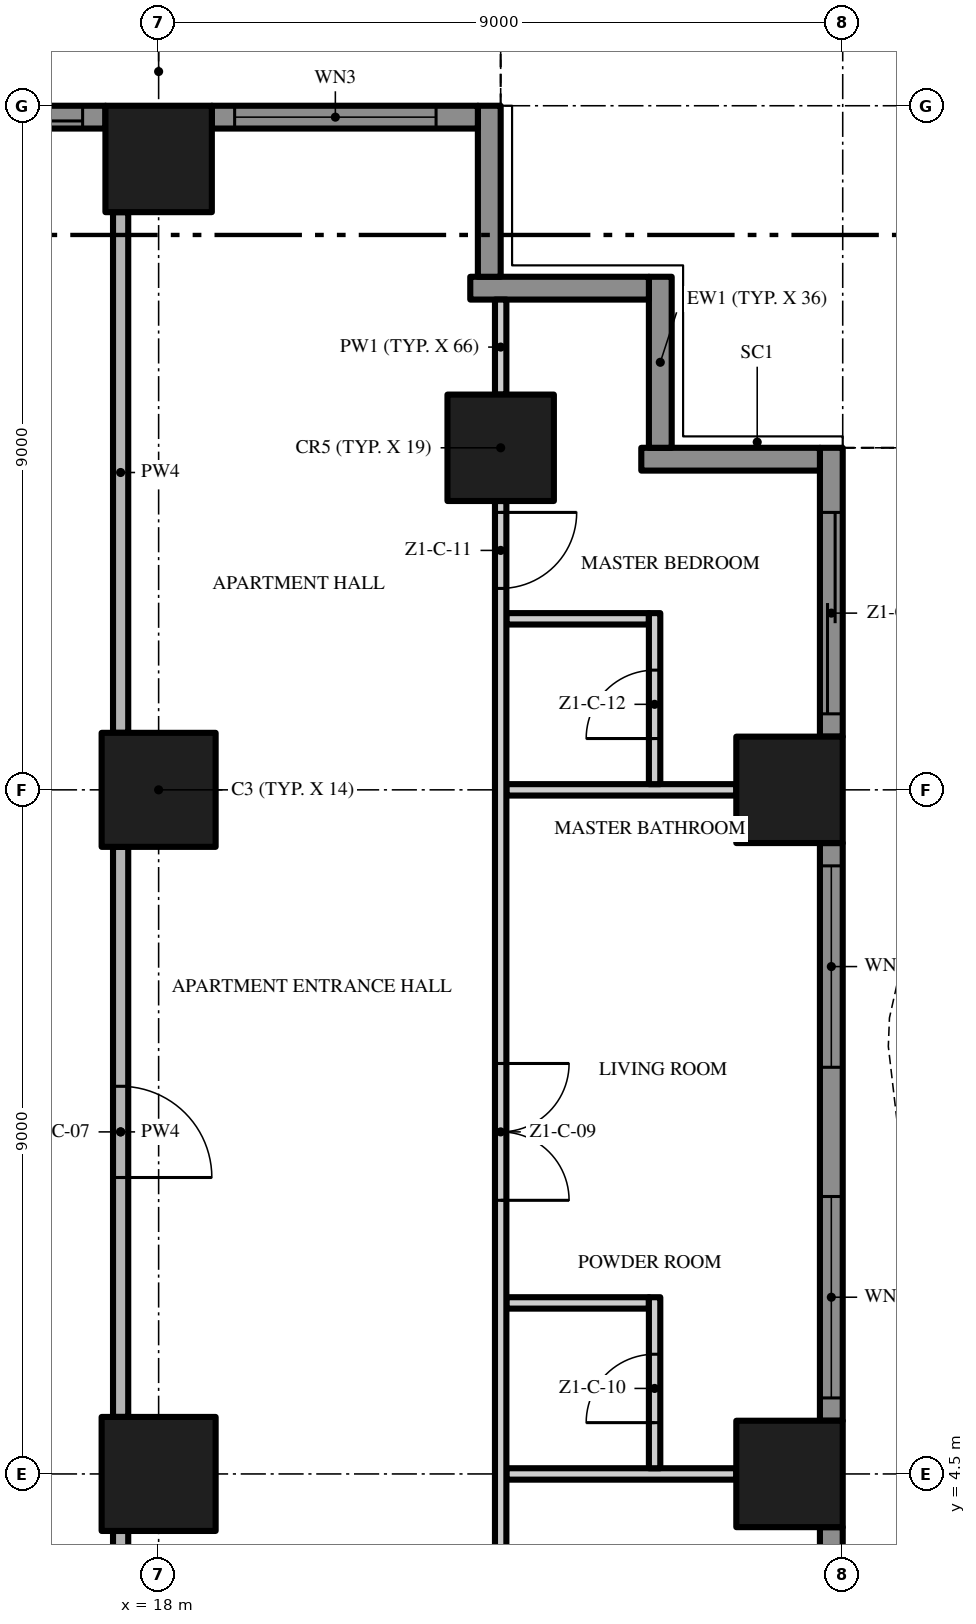
"""IFC4 building model, lengths in metres.
Left out: names, types, materials, properties, quantities, classifications, styles, units other than length and angle.
Written with IfcOpenShell. Run it as: python <this file> out.ifc"""

import sys

from ifc_helpers import new_model, si_unit, direction, frame, frame_2d, origin, origin_2d, place, context, subcontext, project, spatial, polyline, rectangle, outline, extrude, element, fill, save


model = new_model("IFC4")
c1 = context("Model", 3, precision=1e-05, world=origin(), true_north=direction((0.0, 1.0)))
c2 = subcontext(c1, "Body", "Model", "MODEL_VIEW")
j1 = project(units=[si_unit("LENGTHUNIT", "METRE"), si_unit("PLANEANGLEUNIT", "RADIAN")], contexts=[c1])
p1 = place(None, origin())
s1 = spatial("IfcSite", under=j1, at=p1, CompositionType="ELEMENT")
p2 = place(p1, origin())
s2 = spatial("IfcBuilding", under=s1, at=p2, CompositionType="ELEMENT")
p3 = place(p2, frame((0.0, 0.0, 41.6)))
s3 = spatial("IfcBuildingStorey", under=s2, at=p3, CompositionType="ELEMENT", Elevation=41.6)
p4 = place(p3, frame((18.0, 13.5, 0.0), z_axis=(0.0, 0.0, 1.0), x_axis=(1.0, 0.0, 0.0)))
e1 = element("IfcColumn", 1, at=p4, inside=s3, PredefinedType="COLUMN", context=c2, shape_type="SweptSolid", body=[
    extrude(rectangle(XDim=1.5, YDim=1.5, at=origin_2d()), origin(), (0.0, 0.0, 1.0), 3.5),
])
p5 = place(p3, frame((18.0, 21.8, 0.0), z_axis=(0.0, 0.0, 1.0), x_axis=(1.0, 0.0, 0.0)))
e2 = element("IfcColumn", 2, at=p5, inside=s3, PredefinedType="COLUMN", context=c2, shape_type="SweptSolid", body=[
    extrude(rectangle(XDim=1.4, YDim=1.4, at=origin_2d()), origin(), (0.0, 0.0, 1.0), 3.5),
])
p6 = place(p3, frame((18.0, 4.5, 0.0), z_axis=(0.0, 0.0, 1.0), x_axis=(1.0, 0.0, 0.0)))
e3 = element("IfcColumn", 3, at=p6, inside=s3, PredefinedType="COLUMN", context=c2, shape_type="SweptSolid", body=[
    extrude(rectangle(XDim=1.5, YDim=1.5, at=origin_2d()), origin(), (0.0, 0.0, 1.0), 3.5),
])
for number, where, z_axis, x_axis in (
    (4, (26.3, 13.5, 0.0), (0.0, 0.0, 1.0), (1.0, 0.0, 0.0)),
    (5, (22.5, 18.0, 0.0), (0.0, 0.0, 1.0), (1.0, 0.0, 0.0)),
    (6, (26.3, 4.5, 0.0), (0.0, 0.0, 1.0), (1.0, 0.0, 0.0)),
):
    element("IfcColumn", number, at=place(p3, frame(where, z_axis=z_axis, x_axis=x_axis)), inside=s3, PredefinedType="COLUMN", context=c2, shape_type="SweptSolid", body=[
        extrude(rectangle(XDim=1.4, YDim=1.4, at=origin_2d()), origin(), (0.0, 0.0, 1.0), 3.5),
    ])
p7 = place(p3, frame((26.85, 3.8, 0.0), z_axis=(0.0, 0.0, 1.0), x_axis=(0.0, -1.0, 0.0)))
e7 = element("IfcWall", 7, at=p7, inside=s3, PredefinedType="SOLIDWALL", context=c2, shape_type="SweptSolid", body=[
    extrude(rectangle(XDim=7.6, YDim=0.3, at=frame_2d((3.8, 0.0))), origin(), (0.0, 0.0, 1.0), 3.5),
])
p8 = place(p7, frame((4.65, 0.0, 0.45)))
e8 = element("IfcOpeningElement", 8, at=p8, cuts=e7, PredefinedType="OPENING", context=c2, shape_type="SweptSolid", body=[
    extrude(rectangle(XDim=2.65, YDim=2.65, at=frame_2d((1.325, 1.325))), frame((0.0, 0.16, 0.0), z_axis=(0.0, -1.0, 0.0), x_axis=(1.0, 0.0, 0.0)), (0.0, 0.0, 1.0), 0.32),
])
p9 = place(p7, frame((0.3, 0.0, 0.0)))
e9 = element("IfcOpeningElement", 9, at=p9, cuts=e7, PredefinedType="OPENING", context=c2, shape_type="SweptSolid", body=[
    extrude(rectangle(XDim=2.65, YDim=2.4, at=frame_2d((1.325, 1.2))), frame((0.0, 0.16, 0.0), z_axis=(0.0, -1.0, 0.0), x_axis=(1.0, 0.0, 0.0)), (0.0, 0.0, 1.0), 0.32),
])
p10 = place(p3, frame((26.85, 12.8, 0.0), z_axis=(0.0, 0.0, 1.0), x_axis=(0.0, -1.0, 0.0)))
e10 = element("IfcWall", 10, at=p10, inside=s3, PredefinedType="SOLIDWALL", context=c2, shape_type="SweptSolid", body=[
    extrude(rectangle(XDim=7.6, YDim=0.3, at=frame_2d((3.8, 0.0))), origin(), (0.0, 0.0, 1.0), 3.5),
])
p11 = place(p10, frame((4.65, 0.0, 0.45)))
e11 = element("IfcOpeningElement", 11, at=p11, cuts=e10, PredefinedType="OPENING", context=c2, shape_type="SweptSolid", body=[
    extrude(rectangle(XDim=2.65, YDim=2.65, at=frame_2d((1.325, 1.325))), frame((0.0, 0.16, 0.0), z_axis=(0.0, -1.0, 0.0), x_axis=(1.0, 0.0, 0.0)), (0.0, 0.0, 1.0), 0.32),
])
p12 = place(p10, frame((0.3, 0.0, 0.45)))
e12 = element("IfcOpeningElement", 12, at=p12, cuts=e10, PredefinedType="OPENING", context=c2, shape_type="SweptSolid", body=[
    extrude(rectangle(XDim=2.65, YDim=2.65, at=frame_2d((1.325, 1.325))), frame((0.0, 0.16, 0.0), z_axis=(0.0, -1.0, 0.0), x_axis=(1.0, 0.0, 0.0)), (0.0, 0.0, 1.0), 0.32),
])
p13 = place(p3, frame((26.85, 18.0, 0.0), z_axis=(0.0, 0.0, 1.0), x_axis=(0.0, -1.0, 0.0)))
e13 = element("IfcWall", 13, at=p13, inside=s3, PredefinedType="SOLIDWALL", context=c2, shape_type="SweptSolid", body=[
    extrude(rectangle(XDim=3.8, YDim=0.3, at=frame_2d((1.9, 0.0))), origin(), (0.0, 0.0, 1.0), 3.5),
])
p14 = place(p13, frame((0.85, 0.0, 0.0)))
e14 = element("IfcOpeningElement", 14, at=p14, cuts=e13, PredefinedType="OPENING", context=c2, shape_type="SweptSolid", body=[
    extrude(rectangle(XDim=2.65, YDim=2.4, at=frame_2d((1.325, 1.2))), frame((0.0, 0.16, 0.0), z_axis=(0.0, -1.0, 0.0), x_axis=(1.0, 0.0, 0.0)), (0.0, 0.0, 1.0), 0.32),
])
p15 = place(p3, frame((24.35, 17.85, 0.0), z_axis=(0.0, 0.0, 1.0), x_axis=(1.0, 0.0, 0.0)))
e15 = element("IfcWall", 15, at=p15, inside=s3, PredefinedType="SOLIDWALL", context=c2, shape_type="SweptSolid", body=[
    extrude(rectangle(XDim=2.35, YDim=0.3, at=frame_2d((1.175, 0.0))), origin(), (0.0, 0.0, 1.0), 3.5),
])
p16 = place(p3, frame((24.6, 20.25, 0.0), z_axis=(0.0, 0.0, 1.0), x_axis=(0.0, -1.0, 0.0)))
e16 = element("IfcWall", 16, at=p16, inside=s3, PredefinedType="SOLIDWALL", context=c2, shape_type="SweptSolid", body=[
    extrude(rectangle(XDim=2.25, YDim=0.3, at=frame_2d((1.125, 0.0))), origin(), (0.0, 0.0, 1.0), 3.5),
])
p17 = place(p3, frame((22.1, 20.1, 0.0), z_axis=(0.0, 0.0, 1.0), x_axis=(1.0, 0.0, 0.0)))
e17 = element("IfcWall", 17, at=p17, inside=s3, PredefinedType="SOLIDWALL", context=c2, shape_type="SweptSolid", body=[
    extrude(rectangle(XDim=2.35, YDim=0.3, at=frame_2d((1.175, 0.0))), origin(), (0.0, 0.0, 1.0), 3.5),
])
p18 = place(p3, frame((22.35, 22.5, 0.0), z_axis=(0.0, 0.0, 1.0), x_axis=(0.0, -1.0, 0.0)))
e18 = element("IfcWall", 18, at=p18, inside=s3, PredefinedType="SOLIDWALL", context=c2, shape_type="SweptSolid", body=[
    extrude(rectangle(XDim=2.25, YDim=0.3, at=frame_2d((1.125, 0.0))), origin(), (0.0, 0.0, 1.0), 3.5),
])
p19 = place(p3, frame((18.7, 22.35, 0.0), z_axis=(0.0, 0.0, 1.0), x_axis=(1.0, 0.0, 0.0)))
e19 = element("IfcWall", 19, at=p19, inside=s3, PredefinedType="SOLIDWALL", context=c2, shape_type="SweptSolid", body=[
    extrude(rectangle(XDim=3.5, YDim=0.3, at=frame_2d((1.75, 0.0))), origin(), (0.0, 0.0, 1.0), 3.5),
])
p20 = place(p19, frame((0.3, 0.0, 0.45)))
e20 = element("IfcOpeningElement", 20, at=p20, cuts=e19, PredefinedType="OPENING", context=c2, shape_type="SweptSolid", body=[
    extrude(rectangle(XDim=2.65, YDim=2.65, at=frame_2d((1.325, 1.325))), frame((0.0, 0.16, 0.0), z_axis=(0.0, -1.0, 0.0), x_axis=(1.0, 0.0, 0.0)), (0.0, 0.0, 1.0), 0.32),
])
p21 = place(p3, frame((13.5, 22.35, 0.0), z_axis=(0.0, 0.0, 1.0), x_axis=(1.0, 0.0, 0.0)))
e21 = element("IfcWall", 21, at=p21, inside=s3, PredefinedType="SOLIDWALL", context=c2, shape_type="SweptSolid", body=[
    extrude(rectangle(XDim=3.8, YDim=0.3, at=frame_2d((1.9, 0.0))), origin(), (0.0, 0.0, 1.0), 3.5),
])
p22 = place(p21, frame((0.85, 0.0, 0.0)))
e22 = element("IfcOpeningElement", 22, at=p22, cuts=e21, PredefinedType="OPENING", context=c2, shape_type="SweptSolid", body=[
    extrude(rectangle(XDim=2.65, YDim=2.4, at=frame_2d((1.325, 1.2))), frame((0.0, 0.16, 0.0), z_axis=(0.0, -1.0, 0.0), x_axis=(1.0, 0.0, 0.0)), (0.0, 0.0, 1.0), 0.32),
])
p23 = place(p3, origin())
e23 = element("IfcWall", 23, at=p23, inside=s3, PredefinedType="USERDEFINED", context=c2, shape_type="SweptSolid", body=[
    extrude(outline(polyline([(27.951, -18.0), (28.612, -16.5), (29.345, -15.0), (29.869, -13.5), (30.0, -12.375), (29.985, -12.0), (29.649, -10.5), (28.988, -9.0), (28.255, -7.5), (27.731, -6.0), (27.6, -4.875), (27.615, -4.5), (27.951, -3.0), (28.612, -1.5), (29.345, 0.0), (29.869, 1.5), (30.0, 2.625), (29.985, 3.0), (29.649, 4.5), (28.988, 6.0), (28.255, 7.5), (27.731, 9.0), (27.6, 10.125), (27.615, 10.5), (27.951, 12.0), (28.612, 13.5), (29.345, 15.0), (29.869, 16.5), (30.0, 17.625), (29.985, 18.0), (29.735, 17.99), (29.749, 17.635), (29.624, 16.556), (29.114, 15.096), (28.385, 13.605), (27.713, 12.079), (27.366, 10.533), (27.349, 10.115), (27.486, 8.944), (28.024, 7.404), (28.761, 5.895), (29.41, 4.421), (29.736, 2.967), (29.749, 2.635), (29.624, 1.556), (29.114, 0.096), (28.385, -1.395), (27.713, -2.921), (27.366, -4.467), (27.349, -4.885), (27.486, -6.056), (28.024, -7.596), (28.761, -9.105), (29.41, -10.579), (29.736, -12.033), (29.749, -12.365), (29.624, -13.444), (29.114, -14.904), (28.385, -16.395), (27.723, -17.899), (27.951, -18.0)])), origin(), (0.0, 0.0, 1.0), 0.9),
])
p24 = place(p3, frame((22.575, 4.5, 0.0), z_axis=(0.0, 0.0, 1.0), x_axis=(1.0, 0.0, 0.0)))
e24 = element("IfcWall", 24, at=p24, inside=s3, PredefinedType="PARTITIONING", context=c2, shape_type="SweptSolid", body=[
    extrude(rectangle(XDim=3.025, YDim=0.15, at=frame_2d((1.512, 0.0))), origin(), (0.0, 0.0, 1.0), 3.5),
])
p25 = place(p3, frame((22.575, 6.75, 0.0), z_axis=(0.0, 0.0, 1.0), x_axis=(1.0, 0.0, 0.0)))
e25 = element("IfcWall", 25, at=p25, inside=s3, PredefinedType="PARTITIONING", context=c2, shape_type="SweptSolid", body=[
    extrude(rectangle(XDim=1.875, YDim=0.15, at=frame_2d((0.938, 0.0))), origin(), (0.0, 0.0, 1.0), 3.5),
])
p26 = place(p3, frame((22.575, 13.5, 0.0), z_axis=(0.0, 0.0, 1.0), x_axis=(1.0, 0.0, 0.0)))
e26 = element("IfcWall", 26, at=p26, inside=s3, PredefinedType="PARTITIONING", context=c2, shape_type="SweptSolid", body=[
    extrude(rectangle(XDim=3.025, YDim=0.15, at=frame_2d((1.512, 0.0))), origin(), (0.0, 0.0, 1.0), 3.5),
])
p27 = place(p3, frame((22.575, 15.75, 0.0), z_axis=(0.0, 0.0, 1.0), x_axis=(1.0, 0.0, 0.0)))
e27 = element("IfcWall", 27, at=p27, inside=s3, PredefinedType="PARTITIONING", context=c2, shape_type="SweptSolid", body=[
    extrude(rectangle(XDim=1.875, YDim=0.15, at=frame_2d((0.938, 0.0))), origin(), (0.0, 0.0, 1.0), 3.5),
])
p28 = place(p3, frame((17.5, -0.2, 0.0), z_axis=(0.0, 0.0, 1.0), x_axis=(0.0, 1.0, 0.0)))
e28 = element("IfcWall", 28, at=p28, inside=s3, PredefinedType="PARTITIONING", context=c2, shape_type="SweptSolid", body=[
    extrude(rectangle(XDim=3.95, YDim=0.2, at=frame_2d((1.975, 0.0))), origin(), (0.0, 0.0, 1.0), 3.5),
])
p29 = place(p3, frame((17.5, 12.75, 0.0), z_axis=(0.0, 0.0, 1.0), x_axis=(0.0, -1.0, 0.0)))
e29 = element("IfcWall", 29, at=p29, inside=s3, PredefinedType="PARTITIONING", context=c2, shape_type="SweptSolid", body=[
    extrude(rectangle(XDim=7.5, YDim=0.2, at=frame_2d((3.75, 0.0))), origin(), (0.0, 0.0, 1.0), 3.5),
])
p30 = place(p29, frame((3.15, 0.0, 0.0)))
e30 = element("IfcOpeningElement", 30, at=p30, cuts=e29, PredefinedType="OPENING", context=c2, shape_type="SweptSolid", body=[
    extrude(rectangle(XDim=1.2, YDim=2.4, at=frame_2d((0.6, 1.2))), frame((0.0, 0.11, 0.0), z_axis=(0.0, -1.0, 0.0), x_axis=(1.0, 0.0, 0.0)), (0.0, 0.0, 1.0), 0.22),
])
p31 = place(p3, frame((17.5, 14.25, 0.0), z_axis=(0.0, 0.0, 1.0), x_axis=(0.0, 1.0, 0.0)))
e31 = element("IfcWall", 31, at=p31, inside=s3, PredefinedType="PARTITIONING", context=c2, shape_type="SweptSolid", body=[
    extrude(rectangle(XDim=6.85, YDim=0.2, at=frame_2d((3.425, 0.0))), origin(), (0.0, 0.0, 1.0), 3.5),
])
p32 = place(p3, frame((22.5, 17.3, 0.0), z_axis=(0.0, 0.0, 1.0), x_axis=(0.0, -1.0, 0.0)))
e32 = element("IfcWall", 32, at=p32, inside=s3, PredefinedType="PARTITIONING", context=c2, shape_type="SweptSolid", body=[
    extrude(rectangle(XDim=17.2, YDim=0.15, at=frame_2d((8.6, 0.0))), origin(), (0.0, 0.0, 1.0), 3.5),
])
p33 = place(p32, frame((14.55, 0.0, 0.0)))
e33 = element("IfcOpeningElement", 33, at=p33, cuts=e32, PredefinedType="OPENING", context=c2, shape_type="SweptSolid", body=[
    extrude(rectangle(XDim=1.0, YDim=2.4, at=frame_2d((0.5, 1.2))), frame((0.0, 0.085, 0.0), z_axis=(0.0, -1.0, 0.0), x_axis=(1.0, 0.0, 0.0)), (0.0, 0.0, 1.0), 0.17),
])
p34 = place(p32, frame((7.4, 0.0, 0.0)))
e34 = element("IfcOpeningElement", 34, at=p34, cuts=e32, PredefinedType="OPENING", context=c2, shape_type="SweptSolid", body=[
    extrude(rectangle(XDim=1.8, YDim=2.4, at=frame_2d((0.9, 1.2))), frame((0.0, 0.085, 0.0), z_axis=(0.0, -1.0, 0.0), x_axis=(1.0, 0.0, 0.0)), (0.0, 0.0, 1.0), 0.17),
])
p35 = place(p32, frame((0.15, 0.0, 0.0)))
e35 = element("IfcOpeningElement", 35, at=p35, cuts=e32, PredefinedType="OPENING", context=c2, shape_type="SweptSolid", body=[
    extrude(rectangle(XDim=1.0, YDim=2.4, at=frame_2d((0.5, 1.2))), frame((0.0, 0.085, 0.0), z_axis=(0.0, -1.0, 0.0), x_axis=(1.0, 0.0, 0.0)), (0.0, 0.0, 1.0), 0.17),
])
p36 = place(p3, frame((22.5, 18.7, 0.0), z_axis=(0.0, 0.0, 1.0), x_axis=(0.0, 1.0, 0.0)))
e36 = element("IfcWall", 36, at=p36, inside=s3, PredefinedType="PARTITIONING", context=c2, shape_type="SweptSolid", body=[
    extrude(rectangle(XDim=1.25, YDim=0.15, at=frame_2d((0.625, 0.0))), origin(), (0.0, 0.0, 1.0), 3.5),
])
p37 = place(p3, frame((24.525, 4.575, 0.0), z_axis=(0.0, 0.0, 1.0), x_axis=(0.0, 1.0, 0.0)))
e37 = element("IfcWall", 37, at=p37, inside=s3, PredefinedType="PARTITIONING", context=c2, shape_type="SweptSolid", body=[
    extrude(rectangle(XDim=2.25, YDim=0.15, at=frame_2d((1.125, 0.0))), origin(), (0.0, 0.0, 1.0), 3.5),
])
p38 = place(p37, frame((0.6, 0.0, 0.0)))
e38 = element("IfcOpeningElement", 38, at=p38, cuts=e37, PredefinedType="OPENING", context=c2, shape_type="SweptSolid", body=[
    extrude(rectangle(XDim=0.9, YDim=2.1, at=frame_2d((0.45, 1.05))), frame((0.0, 0.085, 0.0), z_axis=(0.0, -1.0, 0.0), x_axis=(1.0, 0.0, 0.0)), (0.0, 0.0, 1.0), 0.17),
])
p39 = place(p3, frame((24.525, 13.575, 0.0), z_axis=(0.0, 0.0, 1.0), x_axis=(0.0, 1.0, 0.0)))
e39 = element("IfcWall", 39, at=p39, inside=s3, PredefinedType="PARTITIONING", context=c2, shape_type="SweptSolid", body=[
    extrude(rectangle(XDim=2.25, YDim=0.15, at=frame_2d((1.125, 0.0))), origin(), (0.0, 0.0, 1.0), 3.5),
])
p40 = place(p39, frame((0.6, 0.0, 0.0)))
e40 = element("IfcOpeningElement", 40, at=p40, cuts=e39, PredefinedType="OPENING", context=c2, shape_type="SweptSolid", body=[
    extrude(rectangle(XDim=0.9, YDim=2.1, at=frame_2d((0.45, 1.05))), frame((0.0, 0.085, 0.0), z_axis=(0.0, -1.0, 0.0), x_axis=(1.0, 0.0, 0.0)), (0.0, 0.0, 1.0), 0.17),
])
p41 = place(p11, origin())
e41 = element("IfcWindow", 41, at=p41, inside=s3, PartitioningType="SINGLE_PANEL", PredefinedType="WINDOW", context=c2, shape_type="SweptSolid", body=[
    extrude(rectangle(XDim=2.65, YDim=2.65, at=frame_2d((1.325, 1.325))), frame((0.0, 0.03, 0.0), z_axis=(0.0, -1.0, 0.0), x_axis=(1.0, 0.0, 0.0)), (0.0, 0.0, 1.0), 0.06),
])
fill(e11, e41)
p42 = place(p12, origin())
e42 = element("IfcWindow", 42, at=p42, inside=s3, PartitioningType="SINGLE_PANEL", PredefinedType="WINDOW", context=c2, shape_type="SweptSolid", body=[
    extrude(rectangle(XDim=2.65, YDim=2.65, at=frame_2d((1.325, 1.325))), frame((0.0, 0.03, 0.0), z_axis=(0.0, -1.0, 0.0), x_axis=(1.0, 0.0, 0.0)), (0.0, 0.0, 1.0), 0.06),
])
fill(e12, e42)
p43 = place(p14, origin())
e43 = element("IfcDoor", 43, at=p43, inside=s3, OperationType="SINGLE_SWING_LEFT", PredefinedType="DOOR", context=c2, shape_type="SweptSolid", body=[
    extrude(rectangle(XDim=2.65, YDim=2.4, at=frame_2d((1.325, 1.2))), frame((0.0, 0.025, 0.0), z_axis=(0.0, -1.0, 0.0), x_axis=(1.0, 0.0, 0.0)), (0.0, 0.0, 1.0), 0.05),
])
fill(e14, e43)
p44 = place(p20, origin())
e44 = element("IfcWindow", 44, at=p44, inside=s3, PartitioningType="SINGLE_PANEL", PredefinedType="WINDOW", context=c2, shape_type="SweptSolid", body=[
    extrude(rectangle(XDim=2.65, YDim=2.65, at=frame_2d((1.325, 1.325))), frame((0.0, 0.03, 0.0), z_axis=(0.0, -1.0, 0.0), x_axis=(1.0, 0.0, 0.0)), (0.0, 0.0, 1.0), 0.06),
])
fill(e20, e44)
p45 = place(p22, origin())
e45 = element("IfcDoor", 45, at=p45, inside=s3, OperationType="SINGLE_SWING_LEFT", PredefinedType="DOOR", context=c2, shape_type="SweptSolid", body=[
    extrude(rectangle(XDim=2.65, YDim=2.4, at=frame_2d((1.325, 1.2))), frame((0.0, 0.025, 0.0), z_axis=(0.0, -1.0, 0.0), x_axis=(1.0, 0.0, 0.0)), (0.0, 0.0, 1.0), 0.05),
])
fill(e22, e45)
p46 = place(p30, origin())
e46 = element("IfcDoor", 46, at=p46, inside=s3, OperationType="SINGLE_SWING_RIGHT", PredefinedType="DOOR", context=c2, shape_type="SweptSolid", body=[
    extrude(rectangle(XDim=1.2, YDim=2.4, at=frame_2d((0.6, 1.2))), frame((0.0, 0.025, 0.0), z_axis=(0.0, -1.0, 0.0), x_axis=(1.0, 0.0, 0.0)), (0.0, 0.0, 1.0), 0.05),
])
fill(e30, e46)
p47 = place(p34, origin())
e47 = element("IfcDoor", 47, at=p47, inside=s3, OperationType="DOUBLE_DOOR_SINGLE_SWING", PredefinedType="DOOR", context=c2, shape_type="SweptSolid", body=[
    extrude(rectangle(XDim=1.8, YDim=2.4, at=frame_2d((0.9, 1.2))), frame((0.0, 0.025, 0.0), z_axis=(0.0, -1.0, 0.0), x_axis=(1.0, 0.0, 0.0)), (0.0, 0.0, 1.0), 0.05),
])
fill(e34, e47)
p48 = place(p38, origin())
e48 = element("IfcDoor", 48, at=p48, inside=s3, OperationType="SINGLE_SWING_LEFT", PredefinedType="DOOR", context=c2, shape_type="SweptSolid", body=[
    extrude(rectangle(XDim=0.9, YDim=2.1, at=frame_2d((0.45, 1.05))), frame((0.0, 0.025, 0.0), z_axis=(0.0, -1.0, 0.0), x_axis=(1.0, 0.0, 0.0)), (0.0, 0.0, 1.0), 0.05),
])
fill(e38, e48)
p49 = place(p35, origin())
e49 = element("IfcDoor", 49, at=p49, inside=s3, OperationType="SINGLE_SWING_LEFT", PredefinedType="DOOR", context=c2, shape_type="SweptSolid", body=[
    extrude(rectangle(XDim=1.0, YDim=2.4, at=frame_2d((0.5, 1.2))), frame((0.0, 0.025, 0.0), z_axis=(0.0, -1.0, 0.0), x_axis=(1.0, 0.0, 0.0)), (0.0, 0.0, 1.0), 0.05),
])
fill(e35, e49)
p50 = place(p40, origin())
e50 = element("IfcDoor", 50, at=p50, inside=s3, OperationType="SINGLE_SWING_LEFT", PredefinedType="DOOR", context=c2, shape_type="SweptSolid", body=[
    extrude(rectangle(XDim=0.9, YDim=2.1, at=frame_2d((0.45, 1.05))), frame((0.0, 0.025, 0.0), z_axis=(0.0, -1.0, 0.0), x_axis=(1.0, 0.0, 0.0)), (0.0, 0.0, 1.0), 0.05),
])
fill(e40, e50)
save(model, sys.argv[1])
